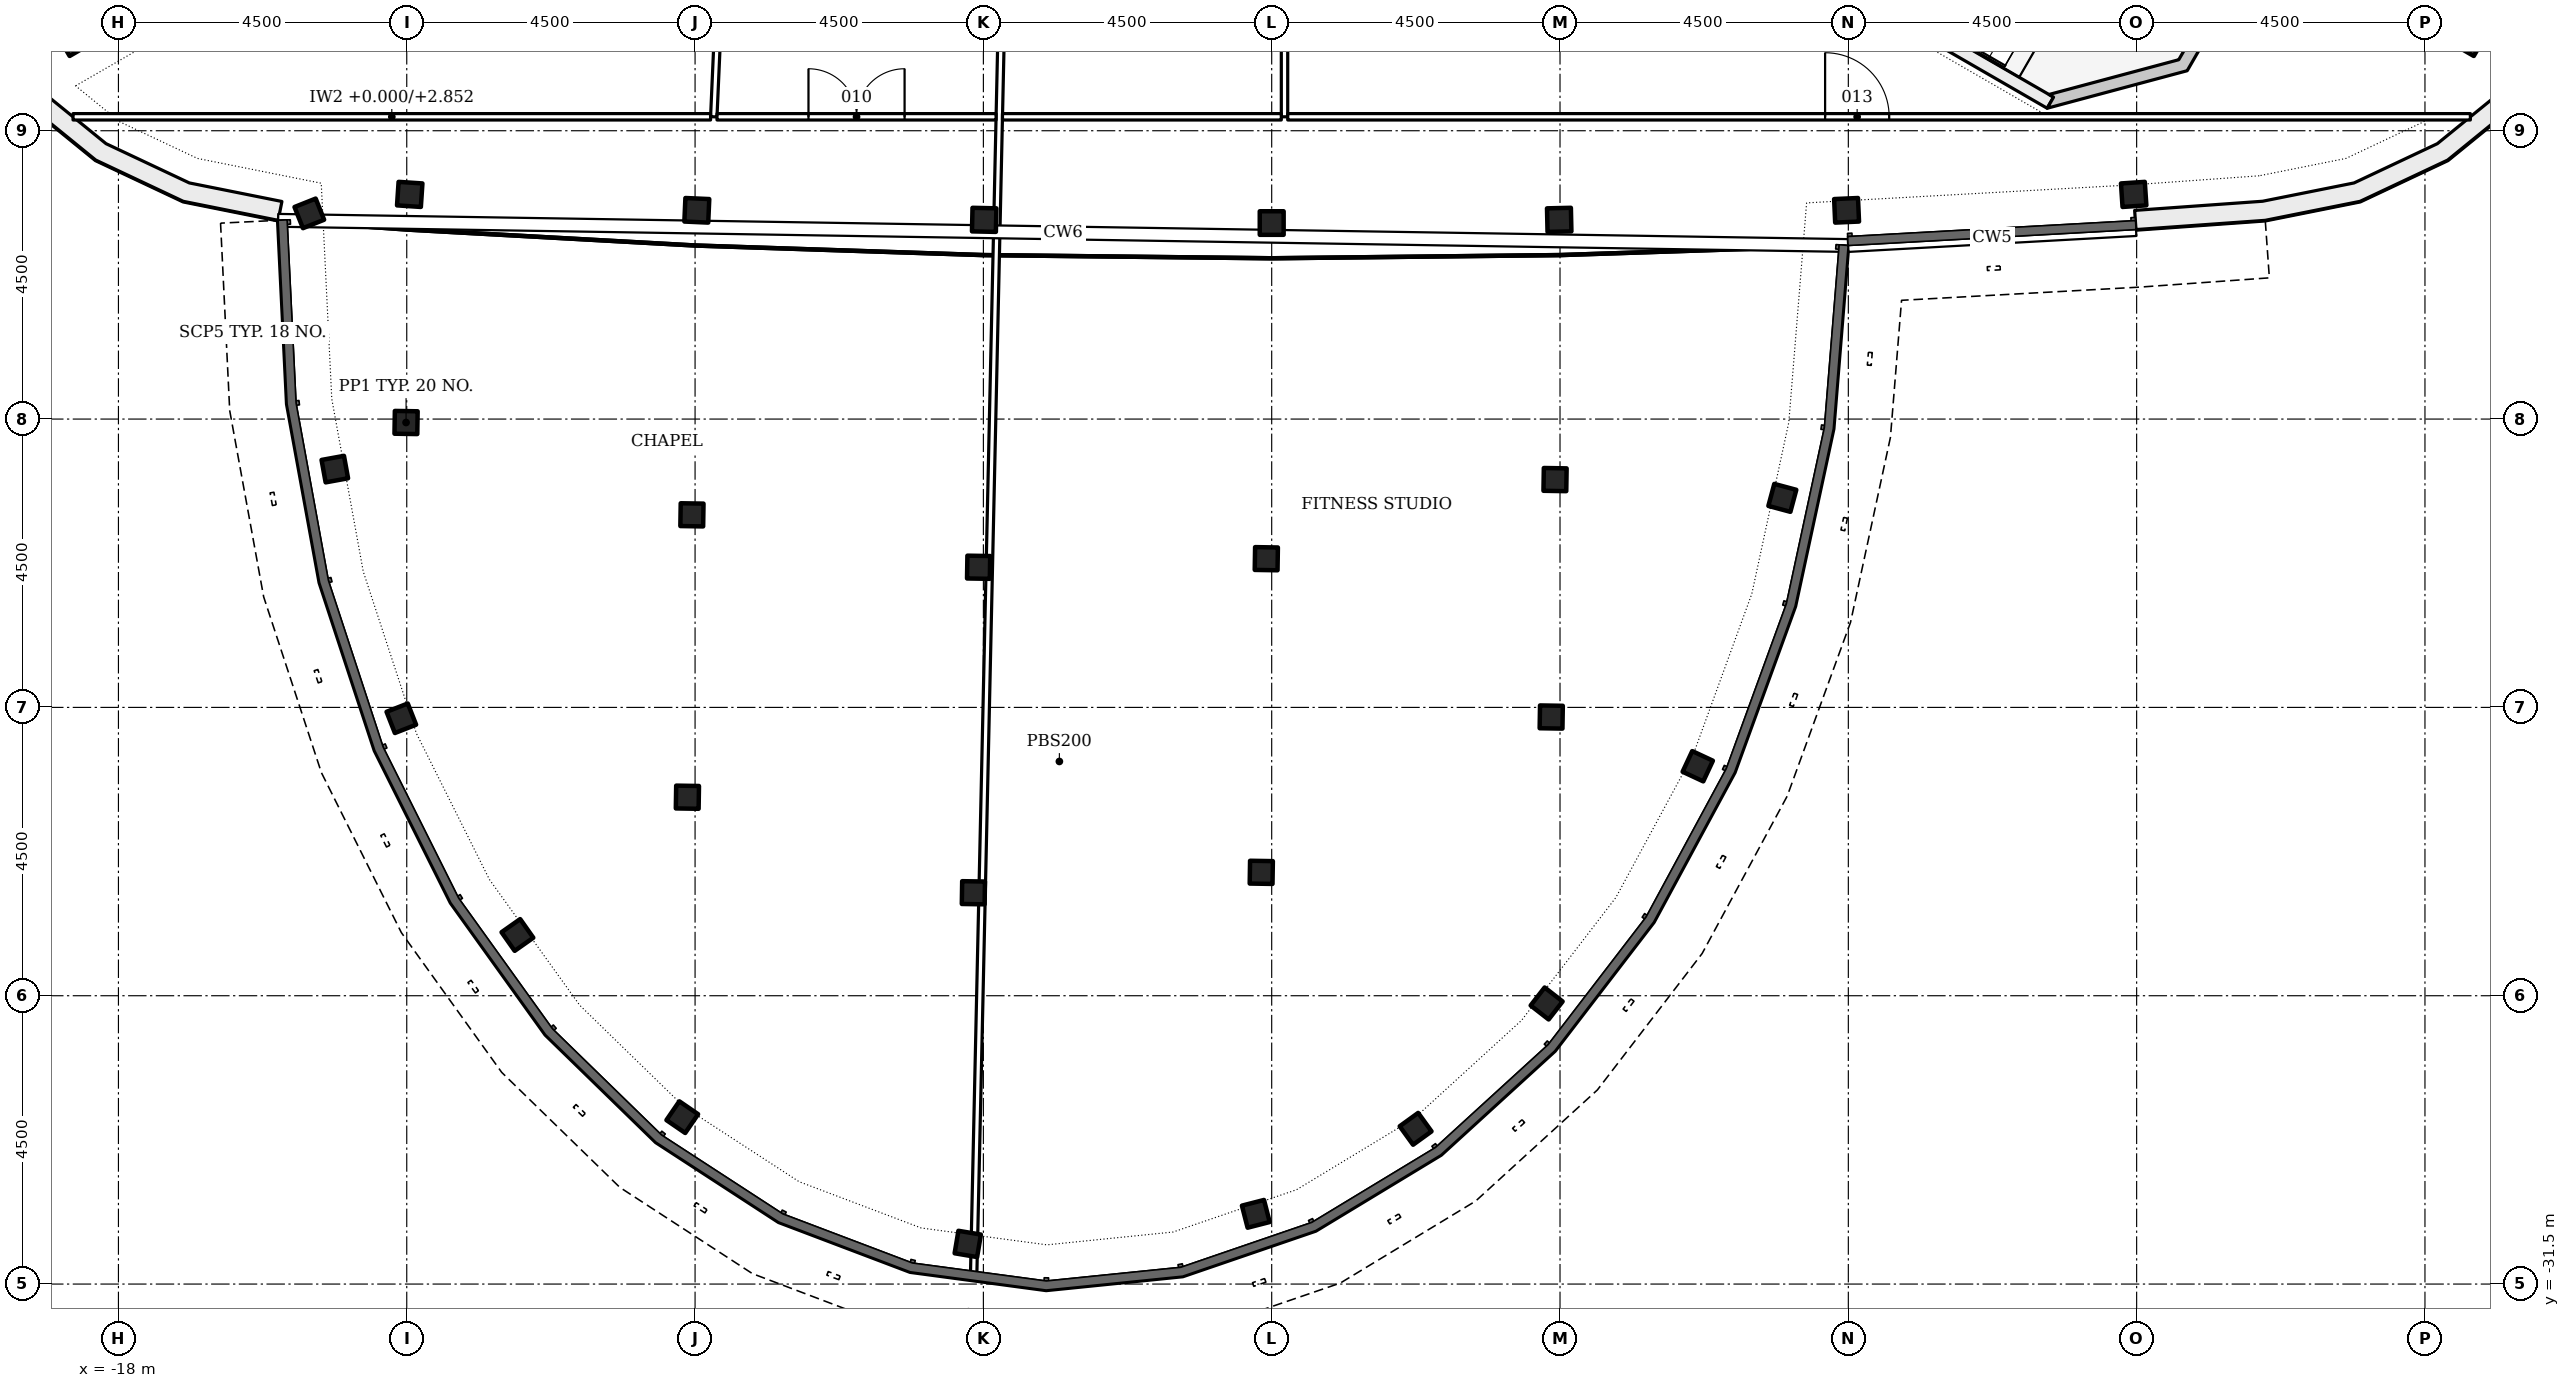
"""IFC4 building model, lengths in metres.
Left out: names, types, materials, properties, quantities, classifications, styles, units other than length and angle.
Written with IfcOpenShell. Run it as: python <this file> out.ifc"""

import sys

from ifc_helpers import new_model, si_unit, direction, frame, frame_2d, origin, origin_2d, place, context, subcontext, project, spatial, polyline, rectangle, hollow_rectangle, i_section, outline, extrude, element, fill, save


model = new_model("IFC4")
c1 = context("Model", 3, precision=1e-05, world=origin(), true_north=direction((0.0, 1.0)))
c2 = subcontext(c1, "Body", "Model", "MODEL_VIEW")
j1 = project(units=[si_unit("LENGTHUNIT", "METRE"), si_unit("PLANEANGLEUNIT", "RADIAN")], contexts=[c1])
p1 = place(None, origin())
s1 = spatial("IfcSite", under=j1, at=p1, CompositionType="ELEMENT")
p2 = place(p1, origin())
s2 = spatial("IfcBuilding", under=s1, at=p2, CompositionType="ELEMENT")
p3 = place(p2, frame((0.0, 0.0, 222.0)))
s3 = spatial("IfcBuildingStorey", under=s2, at=p3, CompositionType="ELEMENT", Elevation=222.0)
for number, where, z_axis, x_axis in (
    (1, (-18.286, -10.558, -0.2), (0.0, 0.0, 1.0), (-0.866, -0.5, 0.0)),
    (2, (18.286, -10.558, -0.2), (0.0, 0.0, 1.0), (0.866, -0.5, 0.0)),
):
    element("IfcColumn", number, at=place(p3, frame(where, z_axis=z_axis, x_axis=x_axis)), inside=s3, PredefinedType="COLUMN", context=c2, shape_type="SweptSolid", body=[
        extrude(rectangle(XDim=2.6, YDim=2.6, at=origin_2d()), origin(), (0.0, 0.0, 1.0), 3.6),
    ])
for number, where, z_axis, x_axis in (
    (3, (-13.454, -14.494, -0.2), (0.0, 0.0, 1.0), (0.998, -0.066, 0.0)),
    (4, (-8.973, -14.742, -0.2), (0.0, 0.0, 1.0), (0.999, -0.044, 0.0)),
    (5, (-4.488, -14.891, -0.2), (0.0, 0.0, 1.0), (1.0, -0.022, 0.0)),
    (6, (0.0, -14.94, -0.2), (0.0, 0.0, 1.0), (1.0, 0.0, 0.0)),
    (7, (4.488, -14.891, -0.2), (0.0, 0.0, 1.0), (1.0, 0.022, 0.0)),
    (8, (8.973, -14.742, -0.2), (0.0, 0.0, 1.0), (0.999, 0.044, 0.0)),
    (9, (13.454, -14.494, -0.2), (0.0, 0.0, 1.0), (0.998, 0.066, 0.0)),
):
    element("IfcColumn", number, at=place(p3, frame(where, z_axis=z_axis, x_axis=x_axis)), inside=s3, PredefinedType="COLUMN", context=c2, shape_type="SweptSolid", body=[
        extrude(i_section(OverallWidth=0.373, OverallDepth=0.368, WebThickness=0.015, FlangeThickness=0.024, FilletRadius=0.015, at=origin_2d()), origin(), (0.0, 0.0, 1.0), 3.6),
    ])
for number, where, z_axis, x_axis in (
    (10, (-13.511, -18.053, -0.2), (0.0, 0.0, 1.0), (-0.016, -1.0, 0.0)),
    (11, (-9.049, -19.495, -0.2), (0.0, 0.0, 1.0), (-0.016, -1.0, 0.0)),
    (12, (-9.12, -23.902, -0.2), (0.0, 0.0, 1.0), (-0.016, -1.0, 0.0)),
    (13, (-4.574, -20.313, -0.2), (0.0, 0.0, 1.0), (-0.016, -1.0, 0.0)),
    (14, (-4.656, -25.393, -0.2), (0.0, 0.0, 1.0), (-0.016, -1.0, 0.0)),
    (15, (-0.084, -20.179, -0.2), (0.0, 0.0, 1.0), (-0.016, -1.0, 0.0)),
    (16, (-0.163, -25.074, -0.2), (0.0, 0.0, 1.0), (-0.016, -1.0, 0.0)),
    (17, (4.422, -18.944, -0.2), (0.0, 0.0, 1.0), (-0.016, -1.0, 0.0)),
    (18, (4.363, -22.65, -0.2), (0.0, 0.0, 1.0), (-0.016, -1.0, 0.0)),
    (19, (-15.021, -14.79, -0.2), (0.0, 0.0, 1.0), (0.37, -0.929, 0.0)),
    (20, (-14.623, -18.781, -0.2), (0.0, 0.0, 1.0), (0.179, -0.984, 0.0)),
    (21, (-13.585, -22.669, -0.2), (0.0, 0.0, 1.0), (0.365, -0.931, 0.0)),
    (22, (-11.773, -26.052, -0.2), (0.0, 0.0, 1.0), (0.576, -0.818, 0.0)),
    (23, (-9.2, -28.895, -0.2), (0.0, 0.0, 1.0), (0.825, -0.566, 0.0)),
    (24, (-4.744, -30.874, -0.2), (0.0, 0.0, 1.0), (0.986, -0.166, 0.0)),
    (25, (-0.248, -30.404, -0.2), (0.0, 0.0, 1.0), (0.969, 0.249, 0.0)),
    (26, (2.246, -29.077, -0.2), (0.0, 0.0, 1.0), (0.81, 0.586, 0.0)),
    (27, (4.291, -27.121, -0.2), (0.0, 0.0, 1.0), (0.614, 0.789, 0.0)),
    (28, (6.65, -23.418, -0.2), (0.0, 0.0, 1.0), (0.423, 0.906, 0.0)),
    (29, (7.97, -19.23, -0.2), (0.0, 0.0, 1.0), (0.259, 0.966, 0.0)),
):
    element("IfcColumn", number, at=place(p3, frame(where, z_axis=z_axis, x_axis=x_axis)), inside=s3, PredefinedType="COLUMN", context=c2, shape_type="SweptSolid", body=[
        extrude(hollow_rectangle(XDim=0.356, YDim=0.356, WallThickness=0.013, at=origin_2d()), origin(), (0.0, 0.0, 1.0), 3.6),
    ])
p4 = place(p3, origin())
e30 = element("IfcWall", 30, at=p4, inside=s3, PredefinedType="NOTDEFINED", context=c2, shape_type="SweptSolid", body=[
    extrude(outline(polyline([(-19.772, -4.162), (-20.656, -5.98), (-21.139, -7.411), (-21.265, -8.917), (-21.025, -10.408), (-20.434, -11.797), (-19.526, -13.004), (-18.354, -13.958), (-16.988, -14.602), (-15.507, -14.898), (-15.448, -14.604), (-16.893, -14.315), (-18.193, -13.702), (-19.308, -12.795), (-20.172, -11.646), (-20.735, -10.324), (-20.963, -8.905), (-20.844, -7.473), (-20.378, -6.094), (-19.502, -4.293), (-19.772, -4.162)])), origin(), (0.0, 0.0, 1.0), 3.3),
])
p5 = place(p3, origin())
e31 = element("IfcWall", 31, at=p5, inside=s3, PredefinedType="NOTDEFINED", context=c2, shape_type="SweptSolid", body=[
    extrude(outline(polyline([(13.49, -15.042), (15.507, -14.898), (16.988, -14.602), (18.354, -13.958), (19.526, -13.004), (20.434, -11.797), (21.025, -10.408), (21.265, -8.917), (21.139, -7.411), (20.656, -5.98), (19.772, -4.162), (19.502, -4.293), (20.378, -6.094), (20.844, -7.473), (20.963, -8.905), (20.735, -10.324), (20.172, -11.646), (19.308, -12.795), (18.193, -13.702), (16.893, -14.315), (15.467, -14.6), (13.469, -14.743), (13.49, -15.042)])), origin(), (0.0, 0.0, 1.0), 3.3),
])
p6 = place(p3, frame((7.304, -10.262, -0.2), z_axis=(0.0, 0.0, 1.0), x_axis=(0.866026594901, -0.49999793692, 0.0)))
e32 = element("IfcWall", 32, at=p6, inside=s3, PredefinedType="SHEAR", context=c2, shape_type="SweptSolid", body=[
    extrude(rectangle(XDim=5.6, YDim=0.2, at=frame_2d((2.8, 0.0))), origin(), (0.0, 0.0, 1.0), 3.6),
])
p7 = place(p6, frame((0.45, 0.0, 0.2)))
e33 = element("IfcOpeningElement", 33, at=p7, cuts=e32, PredefinedType="OPENING", context=c2, shape_type="SweptSolid", body=[
    extrude(rectangle(XDim=1.2, YDim=2.1, at=frame_2d((0.6, 1.05))), frame((0.0, 0.11, 0.0), z_axis=(0.0, -1.0, 0.0), x_axis=(1.0, 0.0, 0.0)), (0.0, 0.0, 1.0), 0.22),
])
p8 = place(p3, frame((0.0, 0.0, -0.2)))
e34 = element("IfcWall", 34, at=p8, inside=s3, PredefinedType="SHEAR", context=c2, shape_type="SweptSolid", body=[
    extrude(outline(polyline([(12.104, -13.149), (14.289, -12.563), (15.364, -10.701), (15.191, -10.601), (14.157, -12.392), (12.132, -12.934), (12.204, -12.976), (12.204, -12.976), (12.204, -12.976), (12.204, -12.976), (12.204, -12.976), (12.204, -12.976), (12.204, -12.976), (12.204, -12.976), (12.204, -12.976), (12.204, -12.976), (12.204, -12.976), (12.204, -12.976), (12.204, -12.976), (12.204, -12.976), (12.204, -12.976), (12.204, -12.976), (12.204, -12.976), (12.104, -13.149)])), origin(), (0.0, 0.0, 1.0), 3.6),
])
p9 = place(p3, frame((-8.536, -9.403, 0.0), z_axis=(0.0, 0.0, 1.0), x_axis=(-0.044201203498, -0.999022649197, 0.0)))
e35 = element("IfcWall", 35, at=p9, inside=s3, PredefinedType="PARTITIONING", context=c2, shape_type="SweptSolid", body=[
    extrude(rectangle(XDim=3.883, YDim=0.1, at=frame_2d((1.941, 0.0))), origin(), (0.0, 0.0, 1.0), 3.4),
])
p10 = place(p9, frame((1.404, 0.0, 0.0)))
e36 = element("IfcOpeningElement", 36, at=p10, cuts=e35, PredefinedType="OPENING", context=c2, shape_type="SweptSolid", body=[
    extrude(rectangle(XDim=1.0, YDim=2.1, at=frame_2d((0.5, 1.05))), frame((0.0, 0.06, 0.0), z_axis=(0.0, -1.0, 0.0), x_axis=(1.0, 0.0, 0.0)), (0.0, 0.0, 1.0), 0.12),
])
p11 = place(p3, frame((-4.166, -9.403, 0.0), z_axis=(0.0, 0.0, 1.0), x_axis=(-0.022131761569, -0.999755062568, 0.0)))
e37 = element("IfcWall", 37, at=p11, inside=s3, PredefinedType="PARTITIONING", context=c2, shape_type="SweptSolid", body=[
    extrude(rectangle(XDim=21.952, YDim=0.1, at=frame_2d((10.976, 0.0))), origin(), (0.0, 0.0, 1.0), 2.847),
])
p12 = place(p11, frame((1.403, 0.0, 0.0)))
e38 = element("IfcOpeningElement", 38, at=p12, cuts=e37, PredefinedType="OPENING", context=c2, shape_type="SweptSolid", body=[
    extrude(rectangle(XDim=1.0, YDim=2.1, at=frame_2d((0.5, 1.05))), frame((0.0, 0.06, 0.0), z_axis=(0.0, -1.0, 0.0), x_axis=(1.0, 0.0, 0.0)), (0.0, 0.0, 1.0), 0.12),
])
p13 = place(p3, frame((0.2, -9.403, 0.0), z_axis=(0.0, 0.0, 1.0), x_axis=(0.0, -1.0, 0.0)))
e39 = element("IfcWall", 39, at=p13, inside=s3, PredefinedType="PARTITIONING", context=c2, shape_type="SweptSolid", body=[
    extrude(rectangle(XDim=3.879, YDim=0.1, at=frame_2d((1.939, 0.0))), origin(), (0.0, 0.0, 1.0), 3.4),
])
p14 = place(p3, frame((-18.709, -13.282, 0.0), z_axis=(0.0, 0.0, 1.0), x_axis=(1.0, 0.0, 0.0)))
e40 = element("IfcWall", 40, at=p14, inside=s3, PredefinedType="PARTITIONING", context=c2, shape_type="SweptSolid", body=[
    extrude(rectangle(XDim=9.951, YDim=0.1, at=frame_2d((4.976, 0.0))), origin(), (0.0, 0.0, 1.0), 2.852),
])
p15 = place(p3, frame((-8.658, -13.282, 0.0), z_axis=(0.0, 0.0, 1.0), x_axis=(1.0, 0.0, 0.0)))
e41 = element("IfcWall", 41, at=p15, inside=s3, PredefinedType="PARTITIONING", context=c2, shape_type="SweptSolid", body=[
    extrude(rectangle(XDim=4.356, YDim=0.1, at=frame_2d((2.178, 0.0))), origin(), (0.0, 0.0, 1.0), 2.852),
])
p16 = place(p15, frame((1.428, 0.0, 0.0)))
e42 = element("IfcOpeningElement", 42, at=p16, cuts=e41, PredefinedType="OPENING", context=c2, shape_type="SweptSolid", body=[
    extrude(rectangle(XDim=1.5, YDim=2.1, at=frame_2d((0.75, 1.05))), frame((0.0, 0.06, 0.0), z_axis=(0.0, -1.0, 0.0), x_axis=(1.0, 0.0, 0.0)), (0.0, 0.0, 1.0), 0.12),
])
p17 = place(p3, frame((-4.202, -13.282, 0.0), z_axis=(0.0, 0.0, 1.0), x_axis=(1.0, 0.0, 0.0)))
e43 = element("IfcWall", 43, at=p17, inside=s3, PredefinedType="PARTITIONING", context=c2, shape_type="SweptSolid", body=[
    extrude(rectangle(XDim=4.352, YDim=0.1, at=frame_2d((2.176, 0.0))), origin(), (0.0, 0.0, 1.0), 2.852),
])
p18 = place(p3, frame((0.25, -13.282, 0.0), z_axis=(0.0, 0.0, 1.0), x_axis=(1.0, 0.0, 0.0)))
e44 = element("IfcWall", 44, at=p18, inside=s3, PredefinedType="PARTITIONING", context=c2, shape_type="SweptSolid", body=[
    extrude(rectangle(XDim=18.459, YDim=0.1, at=frame_2d((9.229, 0.0))), origin(), (0.0, 0.0, 1.0), 2.852),
])
p19 = place(p18, frame((8.387, 0.0, 0.0)))
e45 = element("IfcOpeningElement", 45, at=p19, cuts=e44, PredefinedType="OPENING", context=c2, shape_type="SweptSolid", body=[
    extrude(rectangle(XDim=1.0, YDim=2.1, at=frame_2d((0.5, 1.05))), frame((0.0, 0.06, 0.0), z_axis=(0.0, -1.0, 0.0), x_axis=(1.0, 0.0, 0.0)), (0.0, 0.0, 1.0), 0.12),
])
p20 = place(p16, origin())
e46 = element("IfcDoor", 46, at=p20, inside=s3, OperationType="DOUBLE_DOOR_SINGLE_SWING", PredefinedType="DOOR", context=c2, shape_type="SweptSolid", body=[
    extrude(rectangle(XDim=1.5, YDim=2.1, at=frame_2d((0.75, 1.05))), frame((0.0, 0.025, 0.0), z_axis=(0.0, -1.0, 0.0), x_axis=(1.0, 0.0, 0.0)), (0.0, 0.0, 1.0), 0.05),
])
fill(e42, e46)
p21 = place(p19, origin())
e47 = element("IfcDoor", 47, at=p21, inside=s3, OperationType="SINGLE_SWING_LEFT", PredefinedType="DOOR", context=c2, shape_type="SweptSolid", body=[
    extrude(rectangle(XDim=1.0, YDim=2.1, at=frame_2d((0.5, 1.05))), frame((0.0, 0.025, 0.0), z_axis=(0.0, -1.0, 0.0), x_axis=(1.0, 0.0, 0.0)), (0.0, 0.0, 1.0), 0.05),
])
fill(e45, e47)
save(model, sys.argv[1])
